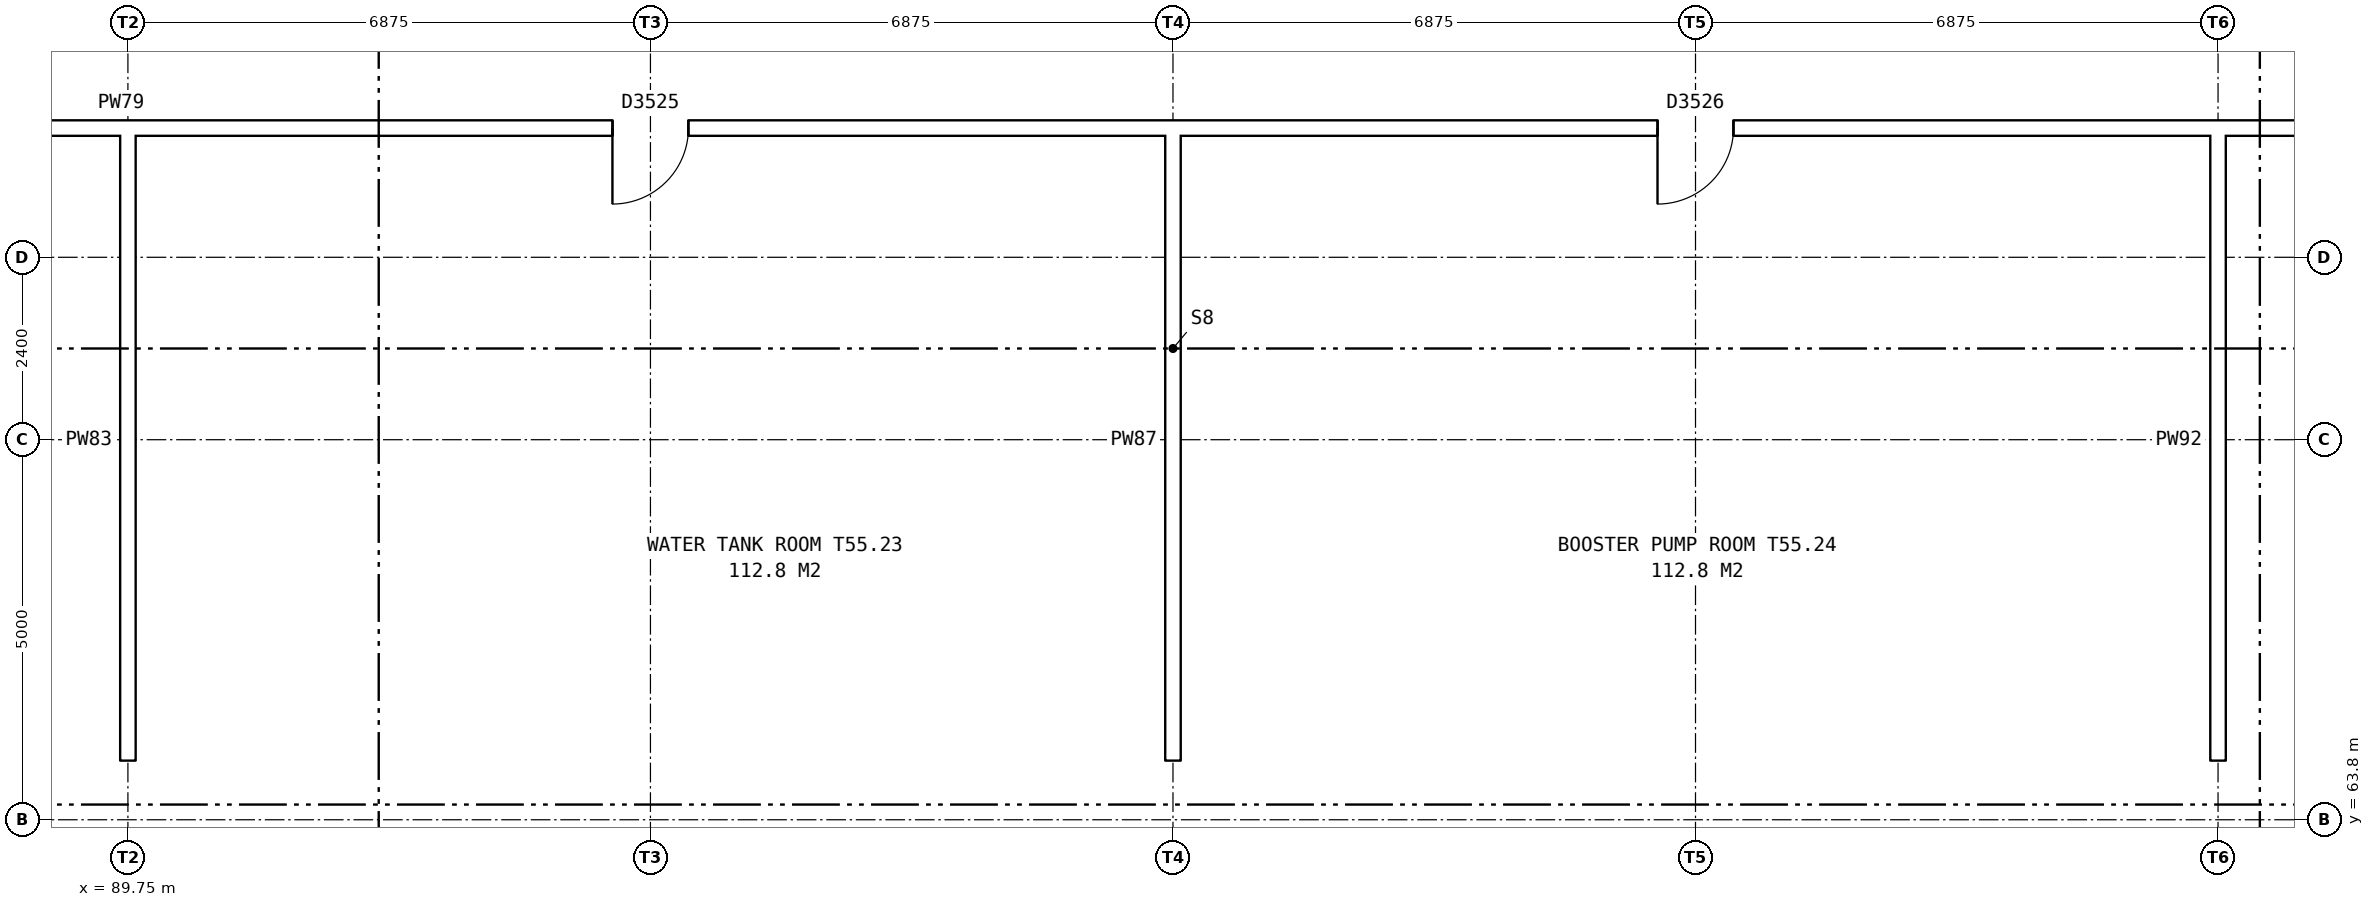
"""IFC4 building model, lengths in metres.
Left out: names, types, materials, properties, quantities, classifications, styles, units other than length and angle.
Written with IfcOpenShell. Run it as: python <this file> out.ifc"""

import sys

from ifc_helpers import new_model, si_unit, direction, frame, frame_2d, origin, place, context, subcontext, project, spatial, rectangle, extrude, element, fill, save


model = new_model("IFC4")
c1 = context("Model", 3, precision=1e-05, world=origin(), true_north=direction((0.0, 1.0)))
c2 = subcontext(c1, "Body", "Model", "MODEL_VIEW")
j1 = project(units=[si_unit("LENGTHUNIT", "METRE"), si_unit("PLANEANGLEUNIT", "RADIAN")], contexts=[c1])
p1 = place(None, origin())
s1 = spatial("IfcSite", under=j1, at=p1, CompositionType="ELEMENT")
p2 = place(p1, origin())
s2 = spatial("IfcBuilding", under=s1, at=p2, CompositionType="ELEMENT")
p3 = place(p2, frame((0.0, 0.0, 194.4)))
s3 = spatial("IfcBuildingStorey", under=s2, at=p3, CompositionType="ELEMENT", Elevation=194.4)
p4 = place(p3, frame((75.64, 72.9, 0.0), z_axis=(0.0, 0.0, 1.0), x_axis=(1.0, 0.0, 0.0)))
e1 = element("IfcWall", 1, at=p4, inside=s3, PredefinedType="PARTITIONING", context=c2, shape_type="SweptSolid", body=[
    extrude(rectangle(XDim=55.72, YDim=0.2, at=frame_2d((27.86, 0.0))), origin(), (0.0, 0.0, 1.0), 3.95),
])
p5 = place(p4, frame((6.555, 0.0, 0.0)))
e2 = element("IfcOpeningElement", 2, at=p5, cuts=e1, PredefinedType="OPENING", context=c2, shape_type="SweptSolid", body=[
    extrude(rectangle(XDim=1.0, YDim=2.1, at=frame_2d((0.5, 1.05))), frame((0.0, 0.11, 0.0), z_axis=(0.0, -1.0, 0.0), x_axis=(1.0, 0.0, 0.0)), (0.0, 0.0, 1.0), 0.22),
])
p6 = place(p4, frame((20.485, 0.0, 0.0)))
e3 = element("IfcOpeningElement", 3, at=p6, cuts=e1, PredefinedType="OPENING", context=c2, shape_type="SweptSolid", body=[
    extrude(rectangle(XDim=1.0, YDim=2.1, at=frame_2d((0.5, 1.05))), frame((0.0, 0.11, 0.0), z_axis=(0.0, -1.0, 0.0), x_axis=(1.0, 0.0, 0.0)), (0.0, 0.0, 1.0), 0.22),
])
p7 = place(p4, frame((34.235, 0.0, 0.0)))
e4 = element("IfcOpeningElement", 4, at=p7, cuts=e1, PredefinedType="OPENING", context=c2, shape_type="SweptSolid", body=[
    extrude(rectangle(XDim=1.0, YDim=2.1, at=frame_2d((0.5, 1.05))), frame((0.0, 0.11, 0.0), z_axis=(0.0, -1.0, 0.0), x_axis=(1.0, 0.0, 0.0)), (0.0, 0.0, 1.0), 0.22),
])
p8 = place(p4, frame((48.165, 0.0, 0.0)))
e5 = element("IfcOpeningElement", 5, at=p8, cuts=e1, PredefinedType="OPENING", context=c2, shape_type="SweptSolid", body=[
    extrude(rectangle(XDim=1.0, YDim=2.1, at=frame_2d((0.5, 1.05))), frame((0.0, 0.11, 0.0), z_axis=(0.0, -1.0, 0.0), x_axis=(1.0, 0.0, 0.0)), (0.0, 0.0, 1.0), 0.22),
])
for number, where, z_axis, x_axis in (
    (6, (89.75, 64.58, 0.0), (0.0, 0.0, 1.0), (0.0, 1.0, 0.0)),
    (7, (103.5, 64.58, 0.0), (0.0, 0.0, 1.0), (0.0, 1.0, 0.0)),
    (8, (117.25, 64.58, 0.0), (0.0, 0.0, 1.0), (0.0, 1.0, 0.0)),
):
    element("IfcWall", number, at=place(p3, frame(where, z_axis=z_axis, x_axis=x_axis)), inside=s3, PredefinedType="PARTITIONING", context=c2, shape_type="SweptSolid", body=[
        extrude(rectangle(XDim=8.42, YDim=0.2, at=frame_2d((4.21, 0.0))), origin(), (0.0, 0.0, 1.0), 3.338),
    ])
p9 = place(p6, frame((1.0, 0.0, 0.0), z_axis=(0.0, 0.0, 1.0), x_axis=(-1.0, 0.0, 0.0)))
e9 = element("IfcDoor", 9, at=p9, inside=s3, OperationType="SINGLE_SWING_RIGHT", PredefinedType="DOOR", context=c2, shape_type="SweptSolid", body=[
    extrude(rectangle(XDim=1.0, YDim=2.1, at=frame_2d((0.5, 1.05))), frame((0.0, 0.025, 0.0), z_axis=(0.0, -1.0, 0.0), x_axis=(1.0, 0.0, 0.0)), (0.0, 0.0, 1.0), 0.05),
])
fill(e3, e9)
p10 = place(p7, frame((1.0, 0.0, 0.0), z_axis=(0.0, 0.0, 1.0), x_axis=(-1.0, 0.0, 0.0)))
e10 = element("IfcDoor", 10, at=p10, inside=s3, OperationType="SINGLE_SWING_RIGHT", PredefinedType="DOOR", context=c2, shape_type="SweptSolid", body=[
    extrude(rectangle(XDim=1.0, YDim=2.1, at=frame_2d((0.5, 1.05))), frame((0.0, 0.025, 0.0), z_axis=(0.0, -1.0, 0.0), x_axis=(1.0, 0.0, 0.0)), (0.0, 0.0, 1.0), 0.05),
])
fill(e4, e10)
save(model, sys.argv[1])
